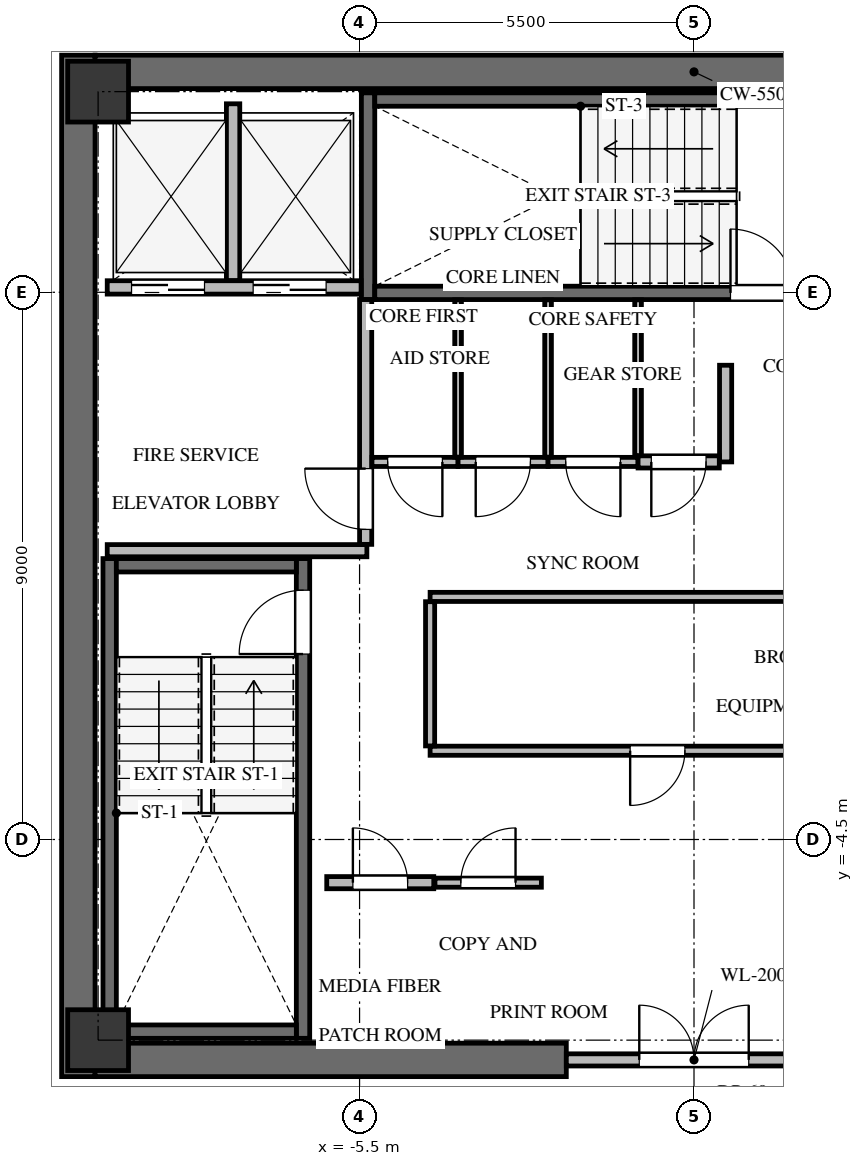
"""IFC4 building model, lengths in metres.
Left out: names, types, materials, properties, quantities, classifications, styles, units other than length and angle.
Written with IfcOpenShell. Run it as: python <this file> out.ifc"""

import sys

from ifc_helpers import new_model, si_unit, direction, frame, frame_2d, origin, origin_2d, place, context, subcontext, project, spatial, rectangle, extrude, source, transform, mapped, element, fill, save


model = new_model("IFC4")
c1 = context("Model", 3, precision=1e-05, world=origin(), true_north=direction((0.0, 1.0)))
c2 = subcontext(c1, "Body", "Model", "MODEL_VIEW")
j1 = project(units=[si_unit("LENGTHUNIT", "METRE"), si_unit("PLANEANGLEUNIT", "RADIAN")], contexts=[c1])
p1 = place(None, origin())
s1 = spatial("IfcSite", under=j1, at=p1, CompositionType="ELEMENT")
p2 = place(p1, origin())
s2 = spatial("IfcBuilding", under=s1, at=p2, CompositionType="ELEMENT")
p3 = place(p2, frame((0.0, 0.0, 261.5)))
s3 = spatial("IfcBuildingStorey", under=s2, at=p3, CompositionType="ELEMENT", Elevation=261.5)
p4 = place(p3, frame((-10.125, -8.4, 0.0), z_axis=(0.0, 0.0, 1.0), x_axis=(0.0, 1.0, 0.0)))
e1 = element("IfcWall", 1, at=p4, inside=s3, PredefinedType="SHEAR", context=c2, shape_type="SweptSolid", body=[
    extrude(rectangle(XDim=16.8, YDim=0.55, at=frame_2d((8.4, 0.0))), origin(), (0.0, 0.0, 1.0), 3.4),
])
p5 = place(p3, frame((-9.85, -8.125, 0.0), z_axis=(0.0, 0.0, 1.0), x_axis=(1.0, 0.0, 0.0)))
e2 = element("IfcWall", 2, at=p5, inside=s3, PredefinedType="SHEAR", context=c2, shape_type="SweptSolid", body=[
    extrude(rectangle(XDim=7.75, YDim=0.55, at=frame_2d((3.875, 0.0))), origin(), (0.0, 0.0, 1.0), 3.4),
])
p6 = place(p3, frame((-9.85, 8.125, 0.0), z_axis=(0.0, 0.0, 1.0), x_axis=(1.0, 0.0, 0.0)))
e3 = element("IfcWall", 3, at=p6, inside=s3, PredefinedType="SHEAR", context=c2, shape_type="SweptSolid", body=[
    extrude(rectangle(XDim=19.7, YDim=0.55, at=frame_2d((9.85, 0.0))), origin(), (0.0, 0.0, 1.0), 3.4),
])
p7 = place(p3, frame((-6.43, -7.77, -0.24), z_axis=(0.0, 0.0, 1.0), x_axis=(0.0, 1.0, 0.0)))
e4 = element("IfcWall", 4, at=p7, inside=s3, PredefinedType="SHEAR", context=c2, shape_type="SweptSolid", body=[
    extrude(rectangle(XDim=7.89, YDim=0.22, at=frame_2d((3.945, 0.0))), origin(), (0.0, 0.0, 1.0), 3.34),
])
p8 = place(p7, frame((6.32, 0.0, 0.0)))
e5 = element("IfcOpeningElement", 5, at=p8, cuts=e4, PredefinedType="OPENING", context=c2, shape_type="SweptSolid", body=[
    extrude(rectangle(XDim=1.05, YDim=2.15, at=frame_2d((0.525, 1.075))), frame((0.0, 0.12, 0.0), z_axis=(0.0, -1.0, 0.0), x_axis=(1.0, 0.0, 0.0)), (0.0, 0.0, 1.0), 0.24),
])
p9 = place(p3, frame((-9.61, 0.12, -0.24), z_axis=(0.0, 0.0, 1.0), x_axis=(0.0, -1.0, 0.0)))
e6 = element("IfcWall", 6, at=p9, inside=s3, PredefinedType="SHEAR", context=c2, shape_type="SweptSolid", body=[
    extrude(rectangle(XDim=7.89, YDim=0.22, at=frame_2d((3.945, 0.0))), origin(), (0.0, 0.0, 1.0), 3.34),
])
for number, where, z_axis, x_axis in (
    (7, (-9.5, -7.66, -0.24), (0.0, 0.0, 1.0), (1.0, 0.0, 0.0)),
    (8, (-6.54, 0.01, -0.24), (0.0, 0.0, 1.0), (-1.0, 0.0, 0.0)),
):
    element("IfcWall", number, at=place(p3, frame(where, z_axis=z_axis, x_axis=x_axis)), inside=s3, PredefinedType="SHEAR", context=c2, shape_type="SweptSolid", body=[
        extrude(rectangle(XDim=2.96, YDim=0.22, at=frame_2d((1.48, 0.0))), origin(), (0.0, 0.0, 1.0), 3.34),
    ])
p10 = place(p3, frame((-5.36, 7.78, -0.24), z_axis=(0.0, 0.0, 1.0), x_axis=(0.0, -1.0, 0.0)))
e9 = element("IfcWall", 9, at=p10, inside=s3, PredefinedType="SHEAR", context=c2, shape_type="SweptSolid", body=[
    extrude(rectangle(XDim=3.4, YDim=0.22, at=frame_2d((1.7, 0.0))), origin(), (0.0, 0.0, 1.0), 3.34),
])
p11 = place(p3, frame((-5.25, 4.49, -0.24), z_axis=(0.0, 0.0, 1.0), x_axis=(1.0, 0.0, 0.0)))
e10 = element("IfcWall", 10, at=p11, inside=s3, PredefinedType="SHEAR", context=c2, shape_type="SweptSolid", body=[
    extrude(rectangle(XDim=7.35, YDim=0.22, at=frame_2d((3.675, 0.0))), origin(), (0.0, 0.0, 1.0), 3.34),
])
p12 = place(p11, frame((5.85, 0.0, 0.0)))
e11 = element("IfcOpeningElement", 11, at=p12, cuts=e10, PredefinedType="OPENING", context=c2, shape_type="SweptSolid", body=[
    extrude(rectangle(XDim=1.05, YDim=2.15, at=frame_2d((0.525, 1.075))), frame((0.0, 0.12, 0.0), z_axis=(0.0, -1.0, 0.0), x_axis=(1.0, 0.0, 0.0)), (0.0, 0.0, 1.0), 0.24),
])
p13 = place(p3, frame((2.1, 7.67, -0.24), z_axis=(0.0, 0.0, 1.0), x_axis=(-1.0, 0.0, 0.0)))
e12 = element("IfcWall", 12, at=p13, inside=s3, PredefinedType="SHEAR", context=c2, shape_type="SweptSolid", body=[
    extrude(rectangle(XDim=7.35, YDim=0.22, at=frame_2d((3.675, 0.0))), origin(), (0.0, 0.0, 1.0), 3.34),
])
m1 = source(origin(), c2, "Body", "SweptSolid", [
    extrude(rectangle(XDim=1.0, YDim=1.0, at=origin_2d()), origin(), (0.0, 0.0, 1.0), 3.34),
])
for number, where, z_axis, x_axis in (
    (13, (-9.8, -7.8, -0.24), (0.0, 0.0, 1.0), (1.0, 0.0, 0.0)),
    (14, (-9.8, 7.8, -0.24), (0.0, 0.0, 1.0), (1.0, 0.0, 0.0)),
):
    element("IfcColumn", number, at=place(p3, frame(where, z_axis=z_axis, x_axis=x_axis)), inside=s3, PredefinedType="COLUMN", context=c2, shape_type="MappedRepresentation", body=[
        mapped(m1, transform((0.0, 0.0, 0.0), x_axis=(1.0, 0.0, 0.0), y_axis=(0.0, 1.0, 0.0), z_axis=(0.0, 0.0, 1.0), scale=1.0)),
    ])
p14 = place(p3, frame((-2.1, -8.125, 0.0), z_axis=(0.0, 0.0, 1.0), x_axis=(1.0, 0.0, 0.0)))
e15 = element("IfcWall", 15, at=p14, inside=s3, PredefinedType="SOLIDWALL", context=c2, shape_type="SweptSolid", body=[
    extrude(rectangle(XDim=4.2, YDim=0.2, at=frame_2d((2.1, 0.0))), origin(), (0.0, 0.0, 1.0), 3.085),
])
p15 = place(p14, frame((1.2, 0.0, 0.0)))
e16 = element("IfcOpeningElement", 16, at=p15, cuts=e15, PredefinedType="OPENING", context=c2, shape_type="SweptSolid", body=[
    extrude(rectangle(XDim=1.8, YDim=2.15, at=frame_2d((0.9, 1.075))), frame((0.0, 0.11, 0.0), z_axis=(0.0, -1.0, 0.0), x_axis=(1.0, 0.0, 0.0)), (0.0, 0.0, 1.0), 0.22),
])
p16 = place(p3, frame((-9.65, 4.58, 0.0), z_axis=(0.0, 0.0, 1.0), x_axis=(1.0, 0.0, 0.0)))
e17 = element("IfcWall", 17, at=p16, inside=s3, PredefinedType="SOLIDWALL", context=c2, shape_type="SweptSolid", body=[
    extrude(rectangle(XDim=4.175, YDim=0.22, at=frame_2d((2.087, 0.0))), origin(), (0.0, 0.0, 1.0), 3.085),
])
p17 = place(p16, frame((0.4, 0.0, 0.0)))
e18 = element("IfcOpeningElement", 18, at=p17, cuts=e17, PredefinedType="OPENING", context=c2, shape_type="SweptSolid", body=[
    extrude(rectangle(XDim=1.2, YDim=2.15, at=frame_2d((0.6, 1.075))), frame((0.0, 0.12, 0.0), z_axis=(0.0, -1.0, 0.0), x_axis=(1.0, 0.0, 0.0)), (0.0, 0.0, 1.0), 0.24),
])
p18 = place(p16, frame((2.4, 0.0, 0.0)))
e19 = element("IfcOpeningElement", 19, at=p18, cuts=e17, PredefinedType="OPENING", context=c2, shape_type="SweptSolid", body=[
    extrude(rectangle(XDim=1.2, YDim=2.15, at=frame_2d((0.6, 1.075))), frame((0.0, 0.12, 0.0), z_axis=(0.0, -1.0, 0.0), x_axis=(1.0, 0.0, 0.0)), (0.0, 0.0, 1.0), 0.24),
])
p19 = place(p3, frame((-7.58, 4.694, 0.0), z_axis=(0.0, 0.0, 1.0), x_axis=(0.0, 1.0, 0.0)))
e20 = element("IfcWall", 20, at=p19, inside=s3, PredefinedType="SOLIDWALL", context=c2, shape_type="SweptSolid", body=[
    extrude(rectangle(XDim=2.906, YDim=0.22, at=frame_2d((1.453, 0.0))), origin(), (0.0, 0.0, 1.0), 3.085),
])
p20 = place(p3, frame((-9.65, 0.25, 0.0), z_axis=(0.0, 0.0, 1.0), x_axis=(1.0, 0.0, 0.0)))
e21 = element("IfcWall", 21, at=p20, inside=s3, PredefinedType="SOLIDWALL", context=c2, shape_type="SweptSolid", body=[
    extrude(rectangle(XDim=4.27, YDim=0.2, at=frame_2d((2.135, 0.0))), origin(), (0.0, 0.0, 1.0), 3.085),
])
p21 = place(p3, frame((-5.4, 0.354, 0.0), z_axis=(0.0, 0.0, 1.0), x_axis=(0.0, 1.0, 0.0)))
e22 = element("IfcWall", 22, at=p21, inside=s3, PredefinedType="SOLIDWALL", context=c2, shape_type="SweptSolid", body=[
    extrude(rectangle(XDim=4.026, YDim=0.2, at=frame_2d((2.013, 0.0))), origin(), (0.0, 0.0, 1.0), 3.085),
])
p22 = place(p21, frame((0.246, 0.0, 0.0)))
e23 = element("IfcOpeningElement", 23, at=p22, cuts=e22, PredefinedType="OPENING", context=c2, shape_type="SweptSolid", body=[
    extrude(rectangle(XDim=1.0, YDim=2.15, at=frame_2d((0.5, 1.075))), frame((0.0, 0.11, 0.0), z_axis=(0.0, -1.0, 0.0), x_axis=(1.0, 0.0, 0.0)), (0.0, 0.0, 1.0), 0.22),
])
p23 = place(p3, frame((-6.04, -5.21, 0.0), z_axis=(0.0, 0.0, 1.0), x_axis=(1.0, 0.0, 0.0)))
e24 = element("IfcWall", 24, at=p23, inside=s3, PredefinedType="SOLIDWALL", context=c2, shape_type="SweptSolid", body=[
    extrude(rectangle(XDim=1.76, YDim=0.2, at=frame_2d((0.88, 0.0))), origin(), (0.0, 0.0, 1.0), 3.085),
])
p24 = place(p23, frame((0.43, 0.0, 0.0)))
e25 = element("IfcOpeningElement", 25, at=p24, cuts=e24, PredefinedType="OPENING", context=c2, shape_type="SweptSolid", body=[
    extrude(rectangle(XDim=0.9, YDim=2.05, at=frame_2d((0.45, 1.025))), frame((0.0, 0.11, 0.0), z_axis=(0.0, -1.0, 0.0), x_axis=(1.0, 0.0, 0.0)), (0.0, 0.0, 1.0), 0.22),
])
p25 = place(p3, frame((-4.26, -5.21, 0.0), z_axis=(0.0, 0.0, 1.0), x_axis=(1.0, 0.0, 0.0)))
e26 = element("IfcWall", 26, at=p25, inside=s3, PredefinedType="PARTITIONING", context=c2, shape_type="SweptSolid", body=[
    extrude(rectangle(XDim=1.75, YDim=0.15, at=frame_2d((0.875, 0.0))), origin(), (0.0, 0.0, 1.0), 3.085),
])
p26 = place(p25, frame((0.425, 0.0, 0.0)))
e27 = element("IfcOpeningElement", 27, at=p26, cuts=e26, PredefinedType="OPENING", context=c2, shape_type="SweptSolid", body=[
    extrude(rectangle(XDim=0.9, YDim=2.05, at=frame_2d((0.45, 1.025))), frame((0.0, 0.085, 0.0), z_axis=(0.0, -1.0, 0.0), x_axis=(1.0, 0.0, 0.0)), (0.0, 0.0, 1.0), 0.17),
])
p27 = place(p3, frame((3.14, -3.04, 0.0), z_axis=(0.0, 0.0, 1.0), x_axis=(-1.0, 0.0, 0.0)))
e28 = element("IfcWall", 28, at=p27, inside=s3, PredefinedType="PARTITIONING", context=c2, shape_type="SweptSolid", body=[
    extrude(rectangle(XDim=7.48, YDim=0.15, at=frame_2d((3.74, 0.0))), origin(), (0.0, 0.0, 1.0), 3.085),
])
p28 = place(p27, frame((3.29, 0.0, 0.0)))
e29 = element("IfcOpeningElement", 29, at=p28, cuts=e28, PredefinedType="OPENING", context=c2, shape_type="SweptSolid", body=[
    extrude(rectangle(XDim=0.9, YDim=2.05, at=frame_2d((0.45, 1.025))), frame((0.0, 0.085, 0.0), z_axis=(0.0, -1.0, 0.0), x_axis=(1.0, 0.0, 0.0)), (0.0, 0.0, 1.0), 0.17),
])
p29 = place(p3, frame((-4.34, -0.51, 0.0), z_axis=(0.0, 0.0, 1.0), x_axis=(1.0, 0.0, 0.0)))
e30 = element("IfcWall", 30, at=p29, inside=s3, PredefinedType="PARTITIONING", context=c2, shape_type="SweptSolid", body=[
    extrude(rectangle(XDim=7.48, YDim=0.15, at=frame_2d((3.74, 0.0))), origin(), (0.0, 0.0, 1.0), 3.085),
])
p30 = place(p3, frame((-4.34, -2.961, 0.0), z_axis=(0.0, 0.0, 1.0), x_axis=(0.0, 1.0, 0.0)))
e31 = element("IfcWall", 31, at=p30, inside=s3, PredefinedType="PARTITIONING", context=c2, shape_type="SweptSolid", body=[
    extrude(rectangle(XDim=2.372, YDim=0.15, at=frame_2d((1.186, 0.0))), origin(), (0.0, 0.0, 1.0), 3.085),
])
p31 = place(p3, frame((-3.88, 1.71, 0.0), z_axis=(0.0, 0.0, 1.0), x_axis=(-1.0, 0.0, 0.0)))
e32 = element("IfcWall", 32, at=p31, inside=s3, PredefinedType="PARTITIONING", context=c2, shape_type="SweptSolid", body=[
    extrude(rectangle(XDim=1.416, YDim=0.15, at=frame_2d((0.708, 0.0))), origin(), (0.0, 0.0, 1.0), 3.085),
])
p32 = place(p31, frame((0.258, 0.0, 0.0)))
e33 = element("IfcOpeningElement", 33, at=p32, cuts=e32, PredefinedType="OPENING", context=c2, shape_type="SweptSolid", body=[
    extrude(rectangle(XDim=0.9, YDim=2.05, at=frame_2d((0.45, 1.025))), frame((0.0, 0.085, 0.0), z_axis=(0.0, -1.0, 0.0), x_axis=(1.0, 0.0, 0.0)), (0.0, 0.0, 1.0), 0.17),
])
p33 = place(p3, frame((-2.4, 1.71, 0.0), z_axis=(0.0, 0.0, 1.0), x_axis=(-1.0, 0.0, 0.0)))
e34 = element("IfcWall", 34, at=p33, inside=s3, PredefinedType="PARTITIONING", context=c2, shape_type="SweptSolid", body=[
    extrude(rectangle(XDim=1.48, YDim=0.15, at=frame_2d((0.74, 0.0))), origin(), (0.0, 0.0, 1.0), 3.085),
])
p34 = place(p33, frame((0.29, 0.0, 0.0)))
e35 = element("IfcOpeningElement", 35, at=p34, cuts=e34, PredefinedType="OPENING", context=c2, shape_type="SweptSolid", body=[
    extrude(rectangle(XDim=0.9, YDim=2.05, at=frame_2d((0.45, 1.025))), frame((0.0, 0.085, 0.0), z_axis=(0.0, -1.0, 0.0), x_axis=(1.0, 0.0, 0.0)), (0.0, 0.0, 1.0), 0.17),
])
p35 = place(p3, frame((-0.92, 1.71, 0.0), z_axis=(0.0, 0.0, 1.0), x_axis=(-1.0, 0.0, 0.0)))
e36 = element("IfcWall", 36, at=p35, inside=s3, PredefinedType="PARTITIONING", context=c2, shape_type="SweptSolid", body=[
    extrude(rectangle(XDim=1.48, YDim=0.15, at=frame_2d((0.74, 0.0))), origin(), (0.0, 0.0, 1.0), 3.085),
])
p36 = place(p35, frame((0.29, 0.0, 0.0)))
e37 = element("IfcOpeningElement", 37, at=p36, cuts=e36, PredefinedType="OPENING", context=c2, shape_type="SweptSolid", body=[
    extrude(rectangle(XDim=0.9, YDim=2.05, at=frame_2d((0.45, 1.025))), frame((0.0, 0.085, 0.0), z_axis=(0.0, -1.0, 0.0), x_axis=(1.0, 0.0, 0.0)), (0.0, 0.0, 1.0), 0.17),
])
p37 = place(p3, frame((0.52, 3.3, 0.0), z_axis=(0.0, 0.0, 1.0), x_axis=(0.0, -1.0, 0.0)))
e38 = element("IfcWall", 38, at=p37, inside=s3, PredefinedType="SOLIDWALL", context=c2, shape_type="SweptSolid", body=[
    extrude(rectangle(XDim=1.59, YDim=0.2, at=frame_2d((0.795, 0.0))), origin(), (0.0, 0.0, 1.0), 3.085),
])
p38 = place(p3, frame((0.416, 1.71, 0.0), z_axis=(0.0, 0.0, 1.0), x_axis=(-1.0, 0.0, 0.0)))
e39 = element("IfcWall", 39, at=p38, inside=s3, PredefinedType="SOLIDWALL", context=c2, shape_type="SweptSolid", body=[
    extrude(rectangle(XDim=1.336, YDim=0.2, at=frame_2d((0.668, 0.0))), origin(), (0.0, 0.0, 1.0), 3.085),
])
p39 = place(p38, frame((0.218, 0.0, 0.0)))
e40 = element("IfcOpeningElement", 40, at=p39, cuts=e39, PredefinedType="OPENING", context=c2, shape_type="SweptSolid", body=[
    extrude(rectangle(XDim=0.9, YDim=2.05, at=frame_2d((0.45, 1.025))), frame((0.0, 0.11, 0.0), z_axis=(0.0, -1.0, 0.0), x_axis=(1.0, 0.0, 0.0)), (0.0, 0.0, 1.0), 0.22),
])
for number, where, z_axis, x_axis in (
    (41, (-3.88, 4.375, 0.0), (0.0, 0.0, 1.0), (0.0, -1.0, 0.0)),
    (42, (-2.4, 4.375, 0.0), (0.0, 0.0, 1.0), (0.0, -1.0, 0.0)),
):
    element("IfcWall", number, at=place(p3, frame(where, z_axis=z_axis, x_axis=x_axis)), inside=s3, PredefinedType="MOVABLE", context=c2, shape_type="SweptSolid", body=[
        extrude(rectangle(XDim=2.586, YDim=0.11, at=frame_2d((1.293, 0.0))), origin(), (0.0, 0.0, 1.0), 3.085),
    ])
p40 = place(p3, frame((-0.92, 4.375, 0.0), z_axis=(0.0, 0.0, 1.0), x_axis=(0.0, -1.0, 0.0)))
e43 = element("IfcWall", 43, at=p40, inside=s3, PredefinedType="MOVABLE", context=c2, shape_type="SweptSolid", body=[
    extrude(rectangle(XDim=2.561, YDim=0.11, at=frame_2d((1.281, 0.0))), origin(), (0.0, 0.0, 1.0), 3.085),
])
m2 = source(origin(), c2, "Body", "SweptSolid", [
    extrude(rectangle(XDim=1.05, YDim=2.15, at=frame_2d((0.525, 1.075))), frame((0.0, 0.025, 0.0), z_axis=(0.0, -1.0, 0.0), x_axis=(1.0, 0.0, 0.0)), (0.0, 0.0, 1.0), 0.05),
])
p41 = place(p8, origin())
e44 = element("IfcDoor", 44, at=p41, inside=s3, OperationType="SINGLE_SWING_LEFT", PredefinedType="DOOR", context=c2, shape_type="MappedRepresentation", body=[
    mapped(m2, transform((0.0, 0.0, 0.0), x_axis=(1.0, 0.0, 0.0), y_axis=(0.0, 1.0, 0.0), z_axis=(0.0, 0.0, 1.0), scale=1.0)),
])
fill(e5, e44)
p42 = place(p12, origin())
e45 = element("IfcDoor", 45, at=p42, inside=s3, OperationType="SINGLE_SWING_LEFT", PredefinedType="DOOR", context=c2, shape_type="MappedRepresentation", body=[
    mapped(m2, transform((0.0, 0.0, 0.0), x_axis=(1.0, 0.0, 0.0), y_axis=(0.0, 1.0, 0.0), z_axis=(0.0, 0.0, 1.0), scale=1.0)),
])
fill(e11, e45)
m3 = source(origin(), c2, "Body", "SweptSolid", [
    extrude(rectangle(XDim=1.8, YDim=2.15, at=frame_2d((0.9, 1.075))), frame((0.0, 0.025, 0.0), z_axis=(0.0, -1.0, 0.0), x_axis=(1.0, 0.0, 0.0)), (0.0, 0.0, 1.0), 0.05),
])
p43 = place(p15, origin())
e46 = element("IfcDoor", 46, at=p43, inside=s3, OperationType="DOUBLE_DOOR_SINGLE_SWING", PredefinedType="DOOR", context=c2, shape_type="MappedRepresentation", body=[
    mapped(m3, transform((0.0, 0.0, 0.0), x_axis=(1.0, 0.0, 0.0), y_axis=(0.0, 1.0, 0.0), z_axis=(0.0, 0.0, 1.0), scale=1.0)),
])
fill(e16, e46)
m4 = source(origin(), c2, "Body", "SweptSolid", [
    extrude(rectangle(XDim=1.2, YDim=2.15, at=frame_2d((0.6, 1.075))), frame((0.0, 0.025, 0.0), z_axis=(0.0, -1.0, 0.0), x_axis=(1.0, 0.0, 0.0)), (0.0, 0.0, 1.0), 0.05),
])
p44 = place(p17, origin())
e47 = element("IfcDoor", 47, at=p44, inside=s3, OperationType="DOUBLE_DOOR_SLIDING", PredefinedType="DOOR", context=c2, shape_type="MappedRepresentation", body=[
    mapped(m4, transform((0.0, 0.0, 0.0), x_axis=(1.0, 0.0, 0.0), y_axis=(0.0, 1.0, 0.0), z_axis=(0.0, 0.0, 1.0), scale=1.0)),
])
fill(e18, e47)
p45 = place(p18, origin())
e48 = element("IfcDoor", 48, at=p45, inside=s3, OperationType="DOUBLE_DOOR_SLIDING", PredefinedType="DOOR", context=c2, shape_type="MappedRepresentation", body=[
    mapped(m4, transform((0.0, 0.0, 0.0), x_axis=(1.0, 0.0, 0.0), y_axis=(0.0, 1.0, 0.0), z_axis=(0.0, 0.0, 1.0), scale=1.0)),
])
fill(e19, e48)
m5 = source(origin(), c2, "Body", "SweptSolid", [
    extrude(rectangle(XDim=1.0, YDim=2.15, at=frame_2d((0.5, 1.075))), frame((0.0, 0.025, 0.0), z_axis=(0.0, -1.0, 0.0), x_axis=(1.0, 0.0, 0.0)), (0.0, 0.0, 1.0), 0.05),
])
p46 = place(p22, origin())
e49 = element("IfcDoor", 49, at=p46, inside=s3, OperationType="SINGLE_SWING_RIGHT", PredefinedType="DOOR", context=c2, shape_type="MappedRepresentation", body=[
    mapped(m5, transform((0.0, 0.0, 0.0), x_axis=(1.0, 0.0, 0.0), y_axis=(0.0, 1.0, 0.0), z_axis=(0.0, 0.0, 1.0), scale=1.0)),
])
fill(e23, e49)
m6 = source(origin(), c2, "Body", "SweptSolid", [
    extrude(rectangle(XDim=0.9, YDim=2.05, at=frame_2d((0.45, 1.025))), frame((0.0, 0.025, 0.0), z_axis=(0.0, -1.0, 0.0), x_axis=(1.0, 0.0, 0.0)), (0.0, 0.0, 1.0), 0.05),
])
p47 = place(p24, origin())
e50 = element("IfcDoor", 50, at=p47, inside=s3, OperationType="SINGLE_SWING_LEFT", PredefinedType="DOOR", context=c2, shape_type="MappedRepresentation", body=[
    mapped(m6, transform((0.0, 0.0, 0.0), x_axis=(1.0, 0.0, 0.0), y_axis=(0.0, 1.0, 0.0), z_axis=(0.0, 0.0, 1.0), scale=1.0)),
])
fill(e25, e50)
m7 = source(origin(), c2, "Body", "SweptSolid", [
    extrude(rectangle(XDim=0.9, YDim=2.05, at=frame_2d((0.45, 1.025))), frame((0.0, 0.025, 0.0), z_axis=(0.0, -1.0, 0.0), x_axis=(1.0, 0.0, 0.0)), (0.0, 0.0, 1.0), 0.05),
])
p48 = place(p26, origin())
e51 = element("IfcDoor", 51, at=p48, inside=s3, OperationType="SINGLE_SWING_RIGHT", PredefinedType="DOOR", context=c2, shape_type="MappedRepresentation", body=[
    mapped(m7, transform((0.0, 0.0, 0.0), x_axis=(1.0, 0.0, 0.0), y_axis=(0.0, 1.0, 0.0), z_axis=(0.0, 0.0, 1.0), scale=1.0)),
])
fill(e27, e51)
p49 = place(p28, origin())
e52 = element("IfcDoor", 52, at=p49, inside=s3, OperationType="SINGLE_SWING_RIGHT", PredefinedType="DOOR", context=c2, shape_type="MappedRepresentation", body=[
    mapped(m7, transform((0.0, 0.0, 0.0), x_axis=(1.0, 0.0, 0.0), y_axis=(0.0, 1.0, 0.0), z_axis=(0.0, 0.0, 1.0), scale=1.0)),
])
fill(e29, e52)
p50 = place(p32, origin())
e53 = element("IfcDoor", 53, at=p50, inside=s3, OperationType="SINGLE_SWING_LEFT", PredefinedType="DOOR", context=c2, shape_type="MappedRepresentation", body=[
    mapped(m6, transform((0.0, 0.0, 0.0), x_axis=(1.0, 0.0, 0.0), y_axis=(0.0, 1.0, 0.0), z_axis=(0.0, 0.0, 1.0), scale=1.0)),
])
fill(e33, e53)
p51 = place(p34, origin())
e54 = element("IfcDoor", 54, at=p51, inside=s3, OperationType="SINGLE_SWING_RIGHT", PredefinedType="DOOR", context=c2, shape_type="MappedRepresentation", body=[
    mapped(m7, transform((0.0, 0.0, 0.0), x_axis=(1.0, 0.0, 0.0), y_axis=(0.0, 1.0, 0.0), z_axis=(0.0, 0.0, 1.0), scale=1.0)),
])
fill(e35, e54)
p52 = place(p36, origin())
e55 = element("IfcDoor", 55, at=p52, inside=s3, OperationType="SINGLE_SWING_LEFT", PredefinedType="DOOR", context=c2, shape_type="MappedRepresentation", body=[
    mapped(m6, transform((0.0, 0.0, 0.0), x_axis=(1.0, 0.0, 0.0), y_axis=(0.0, 1.0, 0.0), z_axis=(0.0, 0.0, 1.0), scale=1.0)),
])
fill(e37, e55)
p53 = place(p39, origin())
e56 = element("IfcDoor", 56, at=p53, inside=s3, OperationType="SINGLE_SWING_RIGHT", PredefinedType="DOOR", context=c2, shape_type="MappedRepresentation", body=[
    mapped(m7, transform((0.0, 0.0, 0.0), x_axis=(1.0, 0.0, 0.0), y_axis=(0.0, 1.0, 0.0), z_axis=(0.0, 0.0, 1.0), scale=1.0)),
])
fill(e40, e56)
save(model, sys.argv[1])
